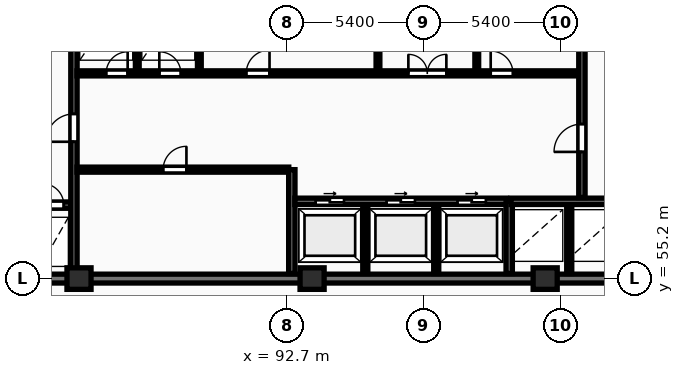
"""IFC4 building model, lengths in metres.
Left out: names, types, materials, properties, quantities, classifications, styles, units other than length and angle.
Written with IfcOpenShell. Run it as: python <this file> out.ifc"""

import sys

from ifc_helpers import new_model, si_unit, direction, frame, frame_2d, origin, origin_2d, place, context, subcontext, project, spatial, rectangle, extrude, element, fill, save


model = new_model("IFC4")
c1 = context("Model", 3, precision=1e-05, world=origin(), true_north=direction((0.0, 1.0)))
c2 = subcontext(c1, "Body", "Model", "MODEL_VIEW")
j1 = project(units=[si_unit("LENGTHUNIT", "METRE"), si_unit("PLANEANGLEUNIT", "RADIAN")], contexts=[c1])
p1 = place(None, origin())
s1 = spatial("IfcSite", under=j1, at=p1, CompositionType="ELEMENT")
p2 = place(p1, origin())
s2 = spatial("IfcBuilding", under=s1, at=p2, CompositionType="ELEMENT")
p3 = place(p2, frame((0.0, 0.0, 132.8)))
s3 = spatial("IfcBuildingStorey", under=s2, at=p3, CompositionType="ELEMENT", Elevation=132.8)
for number, where, z_axis, x_axis in (
    (1, (84.5, 55.2, 0.0), (0.0, 0.0, 1.0), (1.0, 0.0, 0.0)),
    (2, (93.7, 55.2, 0.0), (0.0, 0.0, 1.0), (1.0, 0.0, 0.0)),
    (3, (102.9, 55.2, 0.0), (0.0, 0.0, 1.0), (1.0, 0.0, 0.0)),
):
    element("IfcColumn", number, at=place(p3, frame(where, z_axis=z_axis, x_axis=x_axis)), inside=s3, PredefinedType="COLUMN", context=c2, shape_type="SweptSolid", body=[
        extrude(rectangle(XDim=0.95, YDim=0.85, at=origin_2d()), origin(), (0.0, 0.0, 1.0), 3.25),
    ])
p4 = place(p3, frame((75.95, 55.2, 0.0), z_axis=(0.0, 0.0, 1.0), x_axis=(1.0, 0.0, 0.0)))
e4 = element("IfcWall", 4, at=p4, inside=s3, PredefinedType="SHEAR", context=c2, shape_type="SweptSolid", body=[
    extrude(rectangle(XDim=36.3, YDim=0.35, at=frame_2d((18.15, 0.0))), origin(), (0.0, 0.0, 1.0), 3.25),
])
p5 = place(p3, frame((79.79, 58.1, 0.0), z_axis=(0.0, 0.0, 1.0), x_axis=(1.0, 0.0, 0.0)))
e5 = element("IfcWall", 5, at=p5, inside=s3, PredefinedType="SHEAR", context=c2, shape_type="SweptSolid", body=[
    extrude(rectangle(XDim=4.39, YDim=0.25, at=frame_2d((2.195, 0.0))), origin(), (0.0, 0.0, 1.0), 3.25),
])
p6 = place(p5, frame((1.05, 0.0, 0.0)))
e6 = element("IfcOpeningElement", 6, at=p6, cuts=e5, PredefinedType="OPENING", context=c2, shape_type="SweptSolid", body=[
    extrude(rectangle(XDim=1.12, YDim=2.12, at=frame_2d((0.56, 1.06))), frame((0.0, 0.135, 0.0), z_axis=(0.0, -1.0, 0.0), x_axis=(1.0, 0.0, 0.0)), (0.0, 0.0, 1.0), 0.27),
])
p7 = place(p5, frame((3.26, 0.0, 0.0)))
e7 = element("IfcOpeningElement", 7, at=p7, cuts=e5, PredefinedType="OPENING", context=c2, shape_type="SweptSolid", body=[
    extrude(rectangle(XDim=0.85, YDim=2.05, at=frame_2d((0.425, 1.025))), frame((0.0, 0.135, 0.0), z_axis=(0.0, -1.0, 0.0), x_axis=(1.0, 0.0, 0.0)), (0.0, 0.0, 1.0), 0.27),
])
p8 = place(p3, frame((84.3, 55.4, 0.0), z_axis=(0.0, 0.0, 1.0), x_axis=(0.0, 1.0, 0.0)))
e8 = element("IfcWall", 8, at=p8, inside=s3, PredefinedType="SHEAR", context=c2, shape_type="SweptSolid", body=[
    extrude(rectangle(XDim=11.6, YDim=0.25, at=frame_2d((5.8, 0.0))), origin(), (0.0, 0.0, 1.0), 3.25),
])
p9 = place(p8, frame((5.2, 0.0, 0.0)))
e9 = element("IfcOpeningElement", 9, at=p9, cuts=e8, PredefinedType="OPENING", context=c2, shape_type="SweptSolid", body=[
    extrude(rectangle(XDim=1.1, YDim=2.1, at=frame_2d((0.55, 1.05))), frame((0.0, 0.135, 0.0), z_axis=(0.0, -1.0, 0.0), x_axis=(1.0, 0.0, 0.0)), (0.0, 0.0, 1.0), 0.27),
])
p10 = place(p3, frame((84.42, 59.5, 0.0), z_axis=(0.0, 0.0, 1.0), x_axis=(1.0, 0.0, 0.0)))
e10 = element("IfcWall", 10, at=p10, inside=s3, PredefinedType="PARTITIONING", context=c2, shape_type="SweptSolid", body=[
    extrude(rectangle(XDim=8.36, YDim=0.2, at=frame_2d((4.18, 0.0))), origin(), (0.0, 0.0, 1.0), 2.97),
])
p11 = place(p10, frame((3.4, 0.0, 0.0)))
e11 = element("IfcOpeningElement", 11, at=p11, cuts=e10, PredefinedType="OPENING", context=c2, shape_type="SweptSolid", body=[
    extrude(rectangle(XDim=0.92, YDim=2.08, at=frame_2d((0.46, 1.04))), frame((0.0, 0.11, 0.0), z_axis=(0.0, -1.0, 0.0), x_axis=(1.0, 0.0, 0.0)), (0.0, 0.0, 1.0), 0.22),
])
p12 = place(p3, frame((92.9, 55.4, 0.0), z_axis=(0.0, 0.0, 1.0), x_axis=(0.0, 1.0, 0.0)))
e12 = element("IfcWall", 12, at=p12, inside=s3, PredefinedType="SHEAR", context=c2, shape_type="SweptSolid", body=[
    extrude(rectangle(XDim=4.1, YDim=0.25, at=frame_2d((2.05, 0.0))), origin(), (0.0, 0.0, 1.0), 3.25),
])
for number, where, z_axis, x_axis in (
    (13, (95.8, 55.4, 0.0), (0.0, 0.0, 1.0), (0.0, 1.0, 0.0)),
    (14, (98.6, 55.4, 0.0), (0.0, 0.0, 1.0), (0.0, 1.0, 0.0)),
):
    element("IfcWall", number, at=place(p3, frame(where, z_axis=z_axis, x_axis=x_axis)), inside=s3, PredefinedType="PARTITIONING", context=c2, shape_type="SweptSolid", body=[
        extrude(rectangle(XDim=2.72, YDim=0.2, at=frame_2d((1.36, 0.0))), origin(), (0.0, 0.0, 1.0), 2.97),
    ])
p13 = place(p3, frame((93.02, 58.25, 0.0), z_axis=(0.0, 0.0, 1.0), x_axis=(1.0, 0.0, 0.0)))
e15 = element("IfcWall", 15, at=p13, inside=s3, PredefinedType="SHEAR", context=c2, shape_type="SweptSolid", body=[
    extrude(rectangle(XDim=8.36, YDim=0.25, at=frame_2d((4.18, 0.0))), origin(), (0.0, 0.0, 1.0), 3.25),
])
p14 = place(p13, frame((0.82, 0.0, 0.0)))
e16 = element("IfcOpeningElement", 16, at=p14, cuts=e15, PredefinedType="OPENING", context=c2, shape_type="SweptSolid", body=[
    extrude(rectangle(XDim=1.12, YDim=2.12, at=frame_2d((0.56, 1.06))), frame((0.0, 0.135, 0.0), z_axis=(0.0, -1.0, 0.0), x_axis=(1.0, 0.0, 0.0)), (0.0, 0.0, 1.0), 0.27),
])
p15 = place(p13, frame((3.62, 0.0, 0.0)))
e17 = element("IfcOpeningElement", 17, at=p15, cuts=e15, PredefinedType="OPENING", context=c2, shape_type="SweptSolid", body=[
    extrude(rectangle(XDim=1.12, YDim=2.12, at=frame_2d((0.56, 1.06))), frame((0.0, 0.135, 0.0), z_axis=(0.0, -1.0, 0.0), x_axis=(1.0, 0.0, 0.0)), (0.0, 0.0, 1.0), 0.27),
])
p16 = place(p13, frame((6.42, 0.0, 0.0)))
e18 = element("IfcOpeningElement", 18, at=p16, cuts=e15, PredefinedType="OPENING", context=c2, shape_type="SweptSolid", body=[
    extrude(rectangle(XDim=1.12, YDim=2.12, at=frame_2d((0.56, 1.06))), frame((0.0, 0.135, 0.0), z_axis=(0.0, -1.0, 0.0), x_axis=(1.0, 0.0, 0.0)), (0.0, 0.0, 1.0), 0.27),
])
p17 = place(p3, frame((101.48, 55.4, 0.0), z_axis=(0.0, 0.0, 1.0), x_axis=(0.0, 1.0, 0.0)))
e19 = element("IfcWall", 19, at=p17, inside=s3, PredefinedType="SHEAR", context=c2, shape_type="SweptSolid", body=[
    extrude(rectangle(XDim=2.85, YDim=0.25, at=frame_2d((1.425, 0.0))), origin(), (0.0, 0.0, 1.0), 3.25),
])
p18 = place(p3, frame((103.85, 55.4, 0.0), z_axis=(0.0, 0.0, 1.0), x_axis=(0.0, 1.0, 0.0)))
e20 = element("IfcWall", 20, at=p18, inside=s3, PredefinedType="PARTITIONING", context=c2, shape_type="SweptSolid", body=[
    extrude(rectangle(XDim=2.72, YDim=0.2, at=frame_2d((1.36, 0.0))), origin(), (0.0, 0.0, 1.0), 2.97),
])
p19 = place(p3, frame((101.55, 58.25, 0.0), z_axis=(0.0, 0.0, 1.0), x_axis=(1.0, 0.0, 0.0)))
e21 = element("IfcWall", 21, at=p19, inside=s3, PredefinedType="SHEAR", context=c2, shape_type="SweptSolid", body=[
    extrude(rectangle(XDim=4.6, YDim=0.25, at=frame_2d((2.3, 0.0))), origin(), (0.0, 0.0, 1.0), 3.25),
])
for number, where, z_axis, x_axis in (
    (22, (86.8, 63.4, 0.0), (0.0, 0.0, 1.0), (0.0, 1.0, 0.0)),
    (23, (89.25, 63.4, 0.0), (0.0, 0.0, 1.0), (0.0, 1.0, 0.0)),
    (24, (96.3, 63.4, 0.0), (0.0, 0.0, 1.0), (0.0, 1.0, 0.0)),
    (25, (100.2, 63.4, 0.0), (0.0, 0.0, 1.0), (0.0, 1.0, 0.0)),
):
    element("IfcWall", number, at=place(p3, frame(where, z_axis=z_axis, x_axis=x_axis)), inside=s3, PredefinedType="PARTITIONING", context=c2, shape_type="SweptSolid", body=[
        extrude(rectangle(XDim=3.6, YDim=0.15, at=frame_2d((1.8, 0.0))), origin(), (0.0, 0.0, 1.0), 2.97),
    ])
p20 = place(p3, frame((84.42, 63.3, 0.0), z_axis=(0.0, 0.0, 1.0), x_axis=(1.0, 0.0, 0.0)))
e26 = element("IfcWall", 26, at=p20, inside=s3, PredefinedType="PARTITIONING", context=c2, shape_type="SweptSolid", body=[
    extrude(rectangle(XDim=19.83, YDim=0.2, at=frame_2d((9.915, 0.0))), origin(), (0.0, 0.0, 1.0), 2.97),
])
p21 = place(p20, frame((1.15, 0.0, 0.0)))
e27 = element("IfcOpeningElement", 27, at=p21, cuts=e26, PredefinedType="OPENING", context=c2, shape_type="SweptSolid", body=[
    extrude(rectangle(XDim=0.85, YDim=2.05, at=frame_2d((0.425, 1.025))), frame((0.0, 0.11, 0.0), z_axis=(0.0, -1.0, 0.0), x_axis=(1.0, 0.0, 0.0)), (0.0, 0.0, 1.0), 0.22),
])
p22 = place(p20, frame((3.25, 0.0, 0.0)))
e28 = element("IfcOpeningElement", 28, at=p22, cuts=e26, PredefinedType="OPENING", context=c2, shape_type="SweptSolid", body=[
    extrude(rectangle(XDim=0.85, YDim=2.05, at=frame_2d((0.425, 1.025))), frame((0.0, 0.11, 0.0), z_axis=(0.0, -1.0, 0.0), x_axis=(1.0, 0.0, 0.0)), (0.0, 0.0, 1.0), 0.22),
])
p23 = place(p20, frame((13.08, 0.0, 0.0)))
e29 = element("IfcOpeningElement", 29, at=p23, cuts=e26, PredefinedType="OPENING", context=c2, shape_type="SweptSolid", body=[
    extrude(rectangle(XDim=1.5, YDim=2.2, at=frame_2d((0.75, 1.1))), frame((0.0, 0.11, 0.0), z_axis=(0.0, -1.0, 0.0), x_axis=(1.0, 0.0, 0.0)), (0.0, 0.0, 1.0), 0.22),
])
p24 = place(p20, frame((6.68, 0.0, 0.0)))
e30 = element("IfcOpeningElement", 30, at=p24, cuts=e26, PredefinedType="OPENING", context=c2, shape_type="SweptSolid", body=[
    extrude(rectangle(XDim=0.92, YDim=2.08, at=frame_2d((0.46, 1.04))), frame((0.0, 0.11, 0.0), z_axis=(0.0, -1.0, 0.0), x_axis=(1.0, 0.0, 0.0)), (0.0, 0.0, 1.0), 0.22),
])
p25 = place(p20, frame((16.33, 0.0, 0.0)))
e31 = element("IfcOpeningElement", 31, at=p25, cuts=e26, PredefinedType="OPENING", context=c2, shape_type="SweptSolid", body=[
    extrude(rectangle(XDim=0.88, YDim=2.06, at=frame_2d((0.44, 1.03))), frame((0.0, 0.11, 0.0), z_axis=(0.0, -1.0, 0.0), x_axis=(1.0, 0.0, 0.0)), (0.0, 0.0, 1.0), 0.22),
])
p26 = place(p3, frame((104.35, 58.4, 0.0), z_axis=(0.0, 0.0, 1.0), x_axis=(0.0, 1.0, 0.0)))
e32 = element("IfcWall", 32, at=p26, inside=s3, PredefinedType="SHEAR", context=c2, shape_type="SweptSolid", body=[
    extrude(rectangle(XDim=8.6, YDim=0.25, at=frame_2d((4.3, 0.0))), origin(), (0.0, 0.0, 1.0), 3.25),
])
p27 = place(p26, frame((1.8, 0.0, 0.0)))
e33 = element("IfcOpeningElement", 33, at=p27, cuts=e32, PredefinedType="OPENING", context=c2, shape_type="SweptSolid", body=[
    extrude(rectangle(XDim=1.1, YDim=2.1, at=frame_2d((0.55, 1.05))), frame((0.0, 0.135, 0.0), z_axis=(0.0, -1.0, 0.0), x_axis=(1.0, 0.0, 0.0)), (0.0, 0.0, 1.0), 0.27),
])
p28 = place(p7, origin())
e34 = element("IfcDoor", 34, at=p28, inside=s3, OperationType="SINGLE_SWING_LEFT", PredefinedType="DOOR", context=c2, shape_type="SweptSolid", body=[
    extrude(rectangle(XDim=0.85, YDim=2.05, at=frame_2d((0.425, 1.025))), frame((0.0, 0.025, 0.0), z_axis=(0.0, -1.0, 0.0), x_axis=(1.0, 0.0, 0.0)), (0.0, 0.0, 1.0), 0.05),
])
fill(e7, e34)
p29 = place(p9, origin())
e35 = element("IfcDoor", 35, at=p29, inside=s3, OperationType="SINGLE_SWING_LEFT", PredefinedType="DOOR", context=c2, shape_type="SweptSolid", body=[
    extrude(rectangle(XDim=1.1, YDim=2.1, at=frame_2d((0.55, 1.05))), frame((0.0, 0.025, 0.0), z_axis=(0.0, -1.0, 0.0), x_axis=(1.0, 0.0, 0.0)), (0.0, 0.0, 1.0), 0.05),
])
fill(e9, e35)
p30 = place(p11, origin())
e36 = element("IfcDoor", 36, at=p30, inside=s3, OperationType="SINGLE_SWING_RIGHT", PredefinedType="DOOR", context=c2, shape_type="SweptSolid", body=[
    extrude(rectangle(XDim=0.92, YDim=2.08, at=frame_2d((0.46, 1.04))), frame((0.0, 0.025, 0.0), z_axis=(0.0, -1.0, 0.0), x_axis=(1.0, 0.0, 0.0)), (0.0, 0.0, 1.0), 0.05),
])
fill(e11, e36)
p31 = place(p14, origin())
e37 = element("IfcDoor", 37, at=p31, inside=s3, OperationType="SLIDING_TO_RIGHT", PredefinedType="DOOR", context=c2, shape_type="SweptSolid", body=[
    extrude(rectangle(XDim=1.12, YDim=2.12, at=frame_2d((0.56, 1.06))), frame((0.0, 0.025, 0.0), z_axis=(0.0, -1.0, 0.0), x_axis=(1.0, 0.0, 0.0)), (0.0, 0.0, 1.0), 0.05),
])
fill(e16, e37)
p32 = place(p15, origin())
e38 = element("IfcDoor", 38, at=p32, inside=s3, OperationType="SLIDING_TO_RIGHT", PredefinedType="DOOR", context=c2, shape_type="SweptSolid", body=[
    extrude(rectangle(XDim=1.12, YDim=2.12, at=frame_2d((0.56, 1.06))), frame((0.0, 0.025, 0.0), z_axis=(0.0, -1.0, 0.0), x_axis=(1.0, 0.0, 0.0)), (0.0, 0.0, 1.0), 0.05),
])
fill(e17, e38)
p33 = place(p16, origin())
e39 = element("IfcDoor", 39, at=p33, inside=s3, OperationType="SLIDING_TO_RIGHT", PredefinedType="DOOR", context=c2, shape_type="SweptSolid", body=[
    extrude(rectangle(XDim=1.12, YDim=2.12, at=frame_2d((0.56, 1.06))), frame((0.0, 0.025, 0.0), z_axis=(0.0, -1.0, 0.0), x_axis=(1.0, 0.0, 0.0)), (0.0, 0.0, 1.0), 0.05),
])
fill(e18, e39)
p34 = place(p21, origin())
e40 = element("IfcDoor", 40, at=p34, inside=s3, OperationType="SINGLE_SWING_RIGHT", PredefinedType="DOOR", context=c2, shape_type="SweptSolid", body=[
    extrude(rectangle(XDim=0.85, YDim=2.05, at=frame_2d((0.425, 1.025))), frame((0.0, 0.025, 0.0), z_axis=(0.0, -1.0, 0.0), x_axis=(1.0, 0.0, 0.0)), (0.0, 0.0, 1.0), 0.05),
])
fill(e27, e40)
p35 = place(p22, origin())
e41 = element("IfcDoor", 41, at=p35, inside=s3, OperationType="SINGLE_SWING_LEFT", PredefinedType="DOOR", context=c2, shape_type="SweptSolid", body=[
    extrude(rectangle(XDim=0.85, YDim=2.05, at=frame_2d((0.425, 1.025))), frame((0.0, 0.025, 0.0), z_axis=(0.0, -1.0, 0.0), x_axis=(1.0, 0.0, 0.0)), (0.0, 0.0, 1.0), 0.05),
])
fill(e28, e41)
p36 = place(p23, origin())
e42 = element("IfcDoor", 42, at=p36, inside=s3, OperationType="DOUBLE_DOOR_SINGLE_SWING", PredefinedType="DOOR", context=c2, shape_type="SweptSolid", body=[
    extrude(rectangle(XDim=1.5, YDim=2.2, at=frame_2d((0.75, 1.1))), frame((0.0, 0.025, 0.0), z_axis=(0.0, -1.0, 0.0), x_axis=(1.0, 0.0, 0.0)), (0.0, 0.0, 1.0), 0.05),
])
fill(e29, e42)
p37 = place(p24, origin())
e43 = element("IfcDoor", 43, at=p37, inside=s3, OperationType="SINGLE_SWING_RIGHT", PredefinedType="DOOR", context=c2, shape_type="SweptSolid", body=[
    extrude(rectangle(XDim=0.92, YDim=2.08, at=frame_2d((0.46, 1.04))), frame((0.0, 0.025, 0.0), z_axis=(0.0, -1.0, 0.0), x_axis=(1.0, 0.0, 0.0)), (0.0, 0.0, 1.0), 0.05),
])
fill(e30, e43)
p38 = place(p25, origin())
e44 = element("IfcDoor", 44, at=p38, inside=s3, OperationType="SINGLE_SWING_LEFT", PredefinedType="DOOR", context=c2, shape_type="SweptSolid", body=[
    extrude(rectangle(XDim=0.88, YDim=2.06, at=frame_2d((0.44, 1.03))), frame((0.0, 0.025, 0.0), z_axis=(0.0, -1.0, 0.0), x_axis=(1.0, 0.0, 0.0)), (0.0, 0.0, 1.0), 0.05),
])
fill(e31, e44)
p39 = place(p27, origin())
e45 = element("IfcDoor", 45, at=p39, inside=s3, OperationType="SINGLE_SWING_LEFT", PredefinedType="DOOR", context=c2, shape_type="SweptSolid", body=[
    extrude(rectangle(XDim=1.1, YDim=2.1, at=frame_2d((0.55, 1.05))), frame((0.0, 0.025, 0.0), z_axis=(0.0, -1.0, 0.0), x_axis=(1.0, 0.0, 0.0)), (0.0, 0.0, 1.0), 0.05),
])
fill(e33, e45)
save(model, sys.argv[1])
